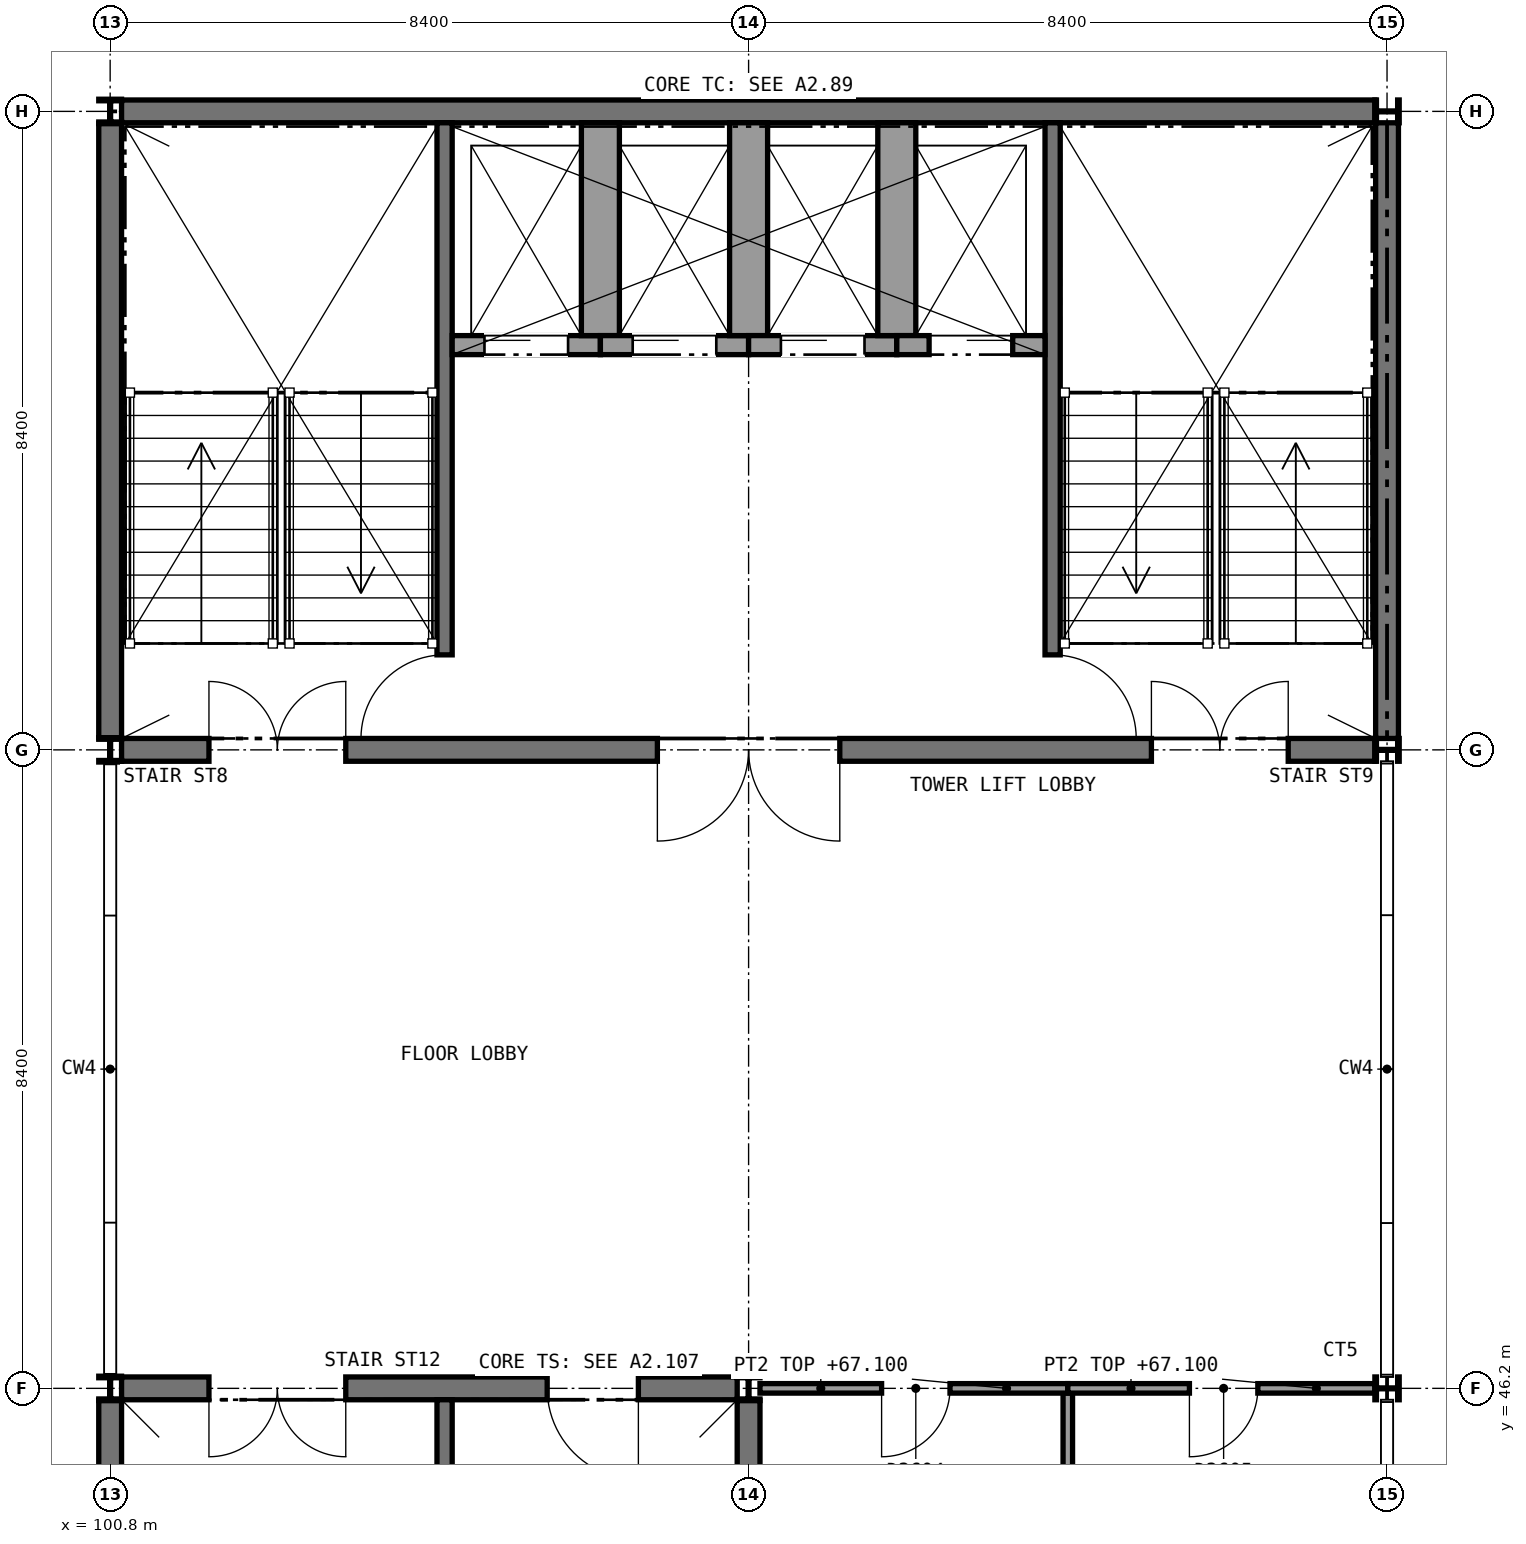
"""IFC4 building model, lengths in metres.
Left out: names, types, materials, properties, quantities, classifications, styles, units other than length and angle.
Written with IfcOpenShell. Run it as: python <this file> out.ifc"""

import sys

from ifc_helpers import new_model, si_unit, direction, frame, frame_2d, origin, origin_2d, place, context, subcontext, project, spatial, rectangle, i_section, extrude, element, fill, save


model = new_model("IFC4")
c1 = context("Model", 3, precision=1e-05, world=origin(), true_north=direction((0.0, 1.0)))
c2 = subcontext(c1, "Body", "Model", "MODEL_VIEW")
j1 = project(units=[si_unit("LENGTHUNIT", "METRE"), si_unit("PLANEANGLEUNIT", "RADIAN")], contexts=[c1])
p1 = place(None, origin())
s1 = spatial("IfcSite", under=j1, at=p1, CompositionType="ELEMENT")
p2 = place(p1, origin())
s2 = spatial("IfcBuilding", under=s1, at=p2, CompositionType="ELEMENT")
p3 = place(p2, frame((0.0, 0.0, 63.6)))
s3 = spatial("IfcBuildingStorey", under=s2, at=p3, CompositionType="ELEMENT", Elevation=63.6)
p4 = place(p3, frame((100.95, 63.0, 0.0), z_axis=(0.0, 0.0, 1.0), x_axis=(1.0, 0.0, 0.0)))
e1 = element("IfcWall", 1, at=p4, inside=s3, PredefinedType="SHEAR", context=c2, shape_type="SweptSolid", body=[
    extrude(rectangle(XDim=16.49, YDim=0.3, at=frame_2d((8.245, 0.0))), origin(), (0.0, 0.0, 1.0), 3.85),
])
p5 = place(p3, frame((100.95, 54.6, 0.0), z_axis=(0.0, 0.0, 1.0), x_axis=(1.0, 0.0, 0.0)))
e2 = element("IfcWall", 2, at=p5, inside=s3, PredefinedType="SHEAR", context=c2, shape_type="SweptSolid", body=[
    extrude(rectangle(XDim=16.49, YDim=0.3, at=frame_2d((8.245, 0.0))), origin(), (0.0, 0.0, 1.0), 3.85),
])
p6 = place(p5, frame((1.15, 0.0, 0.0)))
e3 = element("IfcOpeningElement", 3, at=p6, cuts=e2, PredefinedType="OPENING", context=c2, shape_type="SweptSolid", body=[
    extrude(rectangle(XDim=1.8, YDim=2.1, at=frame_2d((0.9, 1.05))), frame((0.0, 0.16, 0.0), z_axis=(0.0, -1.0, 0.0), x_axis=(1.0, 0.0, 0.0)), (0.0, 0.0, 1.0), 0.32),
])
p7 = place(p5, frame((13.55, 0.0, 0.0)))
e4 = element("IfcOpeningElement", 4, at=p7, cuts=e2, PredefinedType="OPENING", context=c2, shape_type="SweptSolid", body=[
    extrude(rectangle(XDim=1.8, YDim=2.1, at=frame_2d((0.9, 1.05))), frame((0.0, 0.16, 0.0), z_axis=(0.0, -1.0, 0.0), x_axis=(1.0, 0.0, 0.0)), (0.0, 0.0, 1.0), 0.32),
])
p8 = place(p5, frame((7.05, 0.0, 0.0)))
e5 = element("IfcOpeningElement", 5, at=p8, cuts=e2, PredefinedType="OPENING", context=c2, shape_type="SweptSolid", body=[
    extrude(rectangle(XDim=2.4, YDim=2.4, at=frame_2d((1.2, 1.2))), frame((0.0, 0.16, 0.0), z_axis=(0.0, -1.0, 0.0), x_axis=(1.0, 0.0, 0.0)), (0.0, 0.0, 1.0), 0.32),
])
p9 = place(p3, frame((100.8, 54.76, 0.0), z_axis=(0.0, 0.0, 1.0), x_axis=(0.0, 1.0, 0.0)))
e6 = element("IfcWall", 6, at=p9, inside=s3, PredefinedType="SHEAR", context=c2, shape_type="SweptSolid", body=[
    extrude(rectangle(XDim=8.08, YDim=0.3, at=frame_2d((4.04, 0.0))), origin(), (0.0, 0.0, 1.0), 3.85),
])
p10 = place(p3, frame((117.6, 54.75, 0.0), z_axis=(0.0, 0.0, 1.0), x_axis=(0.0, 1.0, 0.0)))
e7 = element("IfcWall", 7, at=p10, inside=s3, PredefinedType="SHEAR", context=c2, shape_type="SweptSolid", body=[
    extrude(rectangle(XDim=8.1, YDim=0.3, at=frame_2d((4.05, 0.0))), origin(), (0.0, 0.0, 1.0), 3.85),
])
p11 = place(p3, frame((100.95, 46.2, 0.0), z_axis=(0.0, 0.0, 1.0), x_axis=(1.0, 0.0, 0.0)))
e8 = element("IfcWall", 8, at=p11, inside=s3, PredefinedType="SHEAR", context=c2, shape_type="SweptSolid", body=[
    extrude(rectangle(XDim=8.1, YDim=0.3, at=frame_2d((4.05, 0.0))), origin(), (0.0, 0.0, 1.0), 3.85),
])
p12 = place(p11, frame((1.15, 0.0, 0.0)))
e9 = element("IfcOpeningElement", 9, at=p12, cuts=e8, PredefinedType="OPENING", context=c2, shape_type="SweptSolid", body=[
    extrude(rectangle(XDim=1.8, YDim=2.1, at=frame_2d((0.9, 1.05))), frame((0.0, 0.16, 0.0), z_axis=(0.0, -1.0, 0.0), x_axis=(1.0, 0.0, 0.0)), (0.0, 0.0, 1.0), 0.32),
])
p13 = place(p11, frame((5.6, 0.0, 0.0)))
e10 = element("IfcOpeningElement", 10, at=p13, cuts=e8, PredefinedType="OPENING", context=c2, shape_type="SweptSolid", body=[
    extrude(rectangle(XDim=1.2, YDim=2.1, at=frame_2d((0.6, 1.05))), frame((0.0, 0.16, 0.0), z_axis=(0.0, -1.0, 0.0), x_axis=(1.0, 0.0, 0.0)), (0.0, 0.0, 1.0), 0.32),
])
for number, where, z_axis, x_axis in (
    (11, (100.8, 37.96, 0.0), (0.0, 0.0, 1.0), (0.0, 1.0, 0.0)),
    (12, (109.2, 37.96, 0.0), (0.0, 0.0, 1.0), (0.0, 1.0, 0.0)),
):
    element("IfcWall", number, at=place(p3, frame(where, z_axis=z_axis, x_axis=x_axis)), inside=s3, PredefinedType="SHEAR", context=c2, shape_type="SweptSolid", body=[
        extrude(rectangle(XDim=8.08, YDim=0.3, at=frame_2d((4.04, 0.0))), origin(), (0.0, 0.0, 1.0), 3.85),
    ])
for number, where, z_axis, x_axis in (
    (13, (100.8, 46.2, 0.0), (0.0, 0.0, 1.0), (1.0, 0.0, 0.0)),
    (14, (100.8, 54.6, 0.0), (0.0, 0.0, 1.0), (1.0, 0.0, 0.0)),
    (15, (100.8, 63.0, 0.0), (0.0, 0.0, 1.0), (1.0, 0.0, 0.0)),
    (16, (109.2, 46.2, 0.0), (0.0, 0.0, 1.0), (1.0, 0.0, 0.0)),
    (17, (117.6, 46.2, 0.0), (0.0, 0.0, 1.0), (0.0, 1.0, 0.0)),
    (18, (117.6, 54.6, 0.0), (0.0, 0.0, 1.0), (0.0, 1.0, 0.0)),
    (19, (117.6, 63.0, 0.0), (0.0, 0.0, 1.0), (0.0, 1.0, 0.0)),
):
    element("IfcColumn", number, at=place(p3, frame(where, z_axis=z_axis, x_axis=x_axis)), inside=s3, PredefinedType="COLUMN", context=c2, shape_type="SweptSolid", body=[
        extrude(i_section(OverallWidth=0.3, OverallDepth=0.32, WebThickness=0.011, FlangeThickness=0.021, FilletRadius=0.027, at=origin_2d()), origin(), (0.0, 0.0, 1.0), 4.0),
    ])
p14 = place(p3, frame((113.4, 37.8, 0.0), z_axis=(0.0, 0.0, 1.0), x_axis=(0.0, 1.0, 0.0)))
e20 = element("IfcWall", 20, at=p14, inside=s3, PredefinedType="PARTITIONING", context=c2, shape_type="SweptSolid", body=[
    extrude(rectangle(XDim=8.4, YDim=0.125, at=frame_2d((4.2, 0.0))), origin(), (0.0, 0.0, 1.0), 3.85),
])
p15 = place(p3, frame((109.35, 46.2, 0.0), z_axis=(0.0, 0.0, 1.0), x_axis=(1.0, 0.0, 0.0)))
e21 = element("IfcWall", 21, at=p15, inside=s3, PredefinedType="PARTITIONING", context=c2, shape_type="SweptSolid", body=[
    extrude(rectangle(XDim=4.05, YDim=0.125, at=frame_2d((2.025, 0.0))), origin(), (0.0, 0.0, 1.0), 3.5),
])
p16 = place(p15, frame((1.6, 0.0, 0.0)))
e22 = element("IfcOpeningElement", 22, at=p16, cuts=e21, PredefinedType="OPENING", context=c2, shape_type="SweptSolid", body=[
    extrude(rectangle(XDim=0.9, YDim=2.1, at=frame_2d((0.45, 1.05))), frame((0.0, 0.073, 0.0), z_axis=(0.0, -1.0, 0.0), x_axis=(1.0, 0.0, 0.0)), (0.0, 0.0, 1.0), 0.145),
])
p17 = place(p3, frame((113.4, 46.2, 0.0), z_axis=(0.0, 0.0, 1.0), x_axis=(1.0, 0.0, 0.0)))
e23 = element("IfcWall", 23, at=p17, inside=s3, PredefinedType="PARTITIONING", context=c2, shape_type="SweptSolid", body=[
    extrude(rectangle(XDim=4.04, YDim=0.125, at=frame_2d((2.02, 0.0))), origin(), (0.0, 0.0, 1.0), 3.5),
])
p18 = place(p17, frame((1.6, 0.0, 0.0)))
e24 = element("IfcOpeningElement", 24, at=p18, cuts=e23, PredefinedType="OPENING", context=c2, shape_type="SweptSolid", body=[
    extrude(rectangle(XDim=0.9, YDim=2.1, at=frame_2d((0.45, 1.05))), frame((0.0, 0.073, 0.0), z_axis=(0.0, -1.0, 0.0), x_axis=(1.0, 0.0, 0.0)), (0.0, 0.0, 1.0), 0.145),
])
p19 = place(p3, frame((105.2, 62.85, 0.0), z_axis=(0.0, 0.0, 1.0), x_axis=(0.0, -1.0, 0.0)))
e25 = element("IfcWall", 25, at=p19, inside=s3, PredefinedType="SHEAR", context=c2, shape_type="SweptSolid", body=[
    extrude(rectangle(XDim=8.1, YDim=0.2, at=frame_2d((4.05, 0.0))), origin(), (0.0, 0.0, 1.0), 3.85),
])
p20 = place(p19, frame((7.0, 0.0, 0.0)))
e26 = element("IfcOpeningElement", 26, at=p20, cuts=e25, PredefinedType="OPENING", context=c2, shape_type="SweptSolid", body=[
    extrude(rectangle(XDim=1.11, YDim=2.1, at=frame_2d((0.555, 1.05))), frame((0.0, 0.11, 0.0), z_axis=(0.0, -1.0, 0.0), x_axis=(1.0, 0.0, 0.0)), (0.0, 0.0, 1.0), 0.22),
])
p21 = place(p3, frame((113.2, 62.85, 0.0), z_axis=(0.0, 0.0, 1.0), x_axis=(0.0, -1.0, 0.0)))
e27 = element("IfcWall", 27, at=p21, inside=s3, PredefinedType="SHEAR", context=c2, shape_type="SweptSolid", body=[
    extrude(rectangle(XDim=8.1, YDim=0.2, at=frame_2d((4.05, 0.0))), origin(), (0.0, 0.0, 1.0), 3.85),
])
p22 = place(p21, frame((7.0, 0.0, 0.0)))
e28 = element("IfcOpeningElement", 28, at=p22, cuts=e27, PredefinedType="OPENING", context=c2, shape_type="SweptSolid", body=[
    extrude(rectangle(XDim=1.11, YDim=2.1, at=frame_2d((0.555, 1.05))), frame((0.0, 0.11, 0.0), z_axis=(0.0, -1.0, 0.0), x_axis=(1.0, 0.0, 0.0)), (0.0, 0.0, 1.0), 0.22),
])
p23 = place(p3, frame((105.3, 59.925, 0.0), z_axis=(0.0, 0.0, 1.0), x_axis=(1.0, 0.0, 0.0)))
e29 = element("IfcWall", 29, at=p23, inside=s3, PredefinedType="SOLIDWALL", context=c2, shape_type="SweptSolid", body=[
    extrude(rectangle(XDim=1.95, YDim=0.25, at=frame_2d((0.975, 0.0))), origin(), (0.0, 0.0, 1.0), 4.0),
])
p24 = place(p23, frame((0.425, 0.0, 0.0)))
e30 = element("IfcOpeningElement", 30, at=p24, cuts=e29, PredefinedType="OPENING", context=c2, shape_type="SweptSolid", body=[
    extrude(rectangle(XDim=1.1, YDim=2.1, at=frame_2d((0.55, 1.05))), frame((0.0, 0.135, 0.0), z_axis=(0.0, -1.0, 0.0), x_axis=(1.0, 0.0, 0.0)), (0.0, 0.0, 1.0), 0.27),
])
p25 = place(p3, frame((107.25, 62.85, 0.0), z_axis=(0.0, 0.0, 1.0), x_axis=(0.0, -1.0, 0.0)))
e31 = element("IfcWall", 31, at=p25, inside=s3, PredefinedType="SOLIDWALL", context=c2, shape_type="SweptSolid", body=[
    extrude(rectangle(XDim=2.8, YDim=0.5, at=frame_2d((1.4, 0.0))), origin(), (0.0, 0.0, 1.0), 4.0),
])
p26 = place(p3, frame((107.25, 59.925, 0.0), z_axis=(0.0, 0.0, 1.0), x_axis=(1.0, 0.0, 0.0)))
e32 = element("IfcWall", 32, at=p26, inside=s3, PredefinedType="SOLIDWALL", context=c2, shape_type="SweptSolid", body=[
    extrude(rectangle(XDim=1.95, YDim=0.25, at=frame_2d((0.975, 0.0))), origin(), (0.0, 0.0, 1.0), 4.0),
])
p27 = place(p26, frame((0.425, 0.0, 0.0)))
e33 = element("IfcOpeningElement", 33, at=p27, cuts=e32, PredefinedType="OPENING", context=c2, shape_type="SweptSolid", body=[
    extrude(rectangle(XDim=1.1, YDim=2.1, at=frame_2d((0.55, 1.05))), frame((0.0, 0.135, 0.0), z_axis=(0.0, -1.0, 0.0), x_axis=(1.0, 0.0, 0.0)), (0.0, 0.0, 1.0), 0.27),
])
p28 = place(p3, frame((109.2, 62.85, 0.0), z_axis=(0.0, 0.0, 1.0), x_axis=(0.0, -1.0, 0.0)))
e34 = element("IfcWall", 34, at=p28, inside=s3, PredefinedType="SOLIDWALL", context=c2, shape_type="SweptSolid", body=[
    extrude(rectangle(XDim=2.8, YDim=0.5, at=frame_2d((1.4, 0.0))), origin(), (0.0, 0.0, 1.0), 4.0),
])
p29 = place(p3, frame((109.2, 59.925, 0.0), z_axis=(0.0, 0.0, 1.0), x_axis=(1.0, 0.0, 0.0)))
e35 = element("IfcWall", 35, at=p29, inside=s3, PredefinedType="SOLIDWALL", context=c2, shape_type="SweptSolid", body=[
    extrude(rectangle(XDim=1.95, YDim=0.25, at=frame_2d((0.975, 0.0))), origin(), (0.0, 0.0, 1.0), 4.0),
])
p30 = place(p29, frame((0.425, 0.0, 0.0)))
e36 = element("IfcOpeningElement", 36, at=p30, cuts=e35, PredefinedType="OPENING", context=c2, shape_type="SweptSolid", body=[
    extrude(rectangle(XDim=1.1, YDim=2.1, at=frame_2d((0.55, 1.05))), frame((0.0, 0.135, 0.0), z_axis=(0.0, -1.0, 0.0), x_axis=(1.0, 0.0, 0.0)), (0.0, 0.0, 1.0), 0.27),
])
p31 = place(p3, frame((111.15, 62.85, 0.0), z_axis=(0.0, 0.0, 1.0), x_axis=(0.0, -1.0, 0.0)))
e37 = element("IfcWall", 37, at=p31, inside=s3, PredefinedType="SOLIDWALL", context=c2, shape_type="SweptSolid", body=[
    extrude(rectangle(XDim=2.8, YDim=0.5, at=frame_2d((1.4, 0.0))), origin(), (0.0, 0.0, 1.0), 4.0),
])
p32 = place(p3, frame((111.15, 59.925, 0.0), z_axis=(0.0, 0.0, 1.0), x_axis=(1.0, 0.0, 0.0)))
e38 = element("IfcWall", 38, at=p32, inside=s3, PredefinedType="SOLIDWALL", context=c2, shape_type="SweptSolid", body=[
    extrude(rectangle(XDim=1.95, YDim=0.25, at=frame_2d((0.975, 0.0))), origin(), (0.0, 0.0, 1.0), 4.0),
])
p33 = place(p32, frame((0.425, 0.0, 0.0)))
e39 = element("IfcOpeningElement", 39, at=p33, cuts=e38, PredefinedType="OPENING", context=c2, shape_type="SweptSolid", body=[
    extrude(rectangle(XDim=1.1, YDim=2.1, at=frame_2d((0.55, 1.05))), frame((0.0, 0.135, 0.0), z_axis=(0.0, -1.0, 0.0), x_axis=(1.0, 0.0, 0.0)), (0.0, 0.0, 1.0), 0.27),
])
p34 = place(p3, frame((105.2, 37.95, 0.0), z_axis=(0.0, 0.0, 1.0), x_axis=(0.0, 1.0, 0.0)))
e40 = element("IfcWall", 40, at=p34, inside=s3, PredefinedType="SHEAR", context=c2, shape_type="SweptSolid", body=[
    extrude(rectangle(XDim=8.1, YDim=0.2, at=frame_2d((4.05, 0.0))), origin(), (0.0, 0.0, 1.0), 3.85),
])
p35 = place(p16, frame((0.9, 0.0, 0.0), z_axis=(0.0, 0.0, 1.0), x_axis=(-1.0, 0.0, 0.0)))
e41 = element("IfcDoor", 41, at=p35, inside=s3, OperationType="SINGLE_SWING_RIGHT", PredefinedType="DOOR", context=c2, shape_type="SweptSolid", body=[
    extrude(rectangle(XDim=0.9, YDim=2.1, at=frame_2d((0.45, 1.05))), frame((0.0, 0.025, 0.0), z_axis=(0.0, -1.0, 0.0), x_axis=(1.0, 0.0, 0.0)), (0.0, 0.0, 1.0), 0.05),
])
fill(e22, e41)
p36 = place(p18, frame((0.9, 0.0, 0.0), z_axis=(0.0, 0.0, 1.0), x_axis=(-1.0, 0.0, 0.0)))
e42 = element("IfcDoor", 42, at=p36, inside=s3, OperationType="SINGLE_SWING_RIGHT", PredefinedType="DOOR", context=c2, shape_type="SweptSolid", body=[
    extrude(rectangle(XDim=0.9, YDim=2.1, at=frame_2d((0.45, 1.05))), frame((0.0, 0.025, 0.0), z_axis=(0.0, -1.0, 0.0), x_axis=(1.0, 0.0, 0.0)), (0.0, 0.0, 1.0), 0.05),
])
fill(e24, e42)
p37 = place(p20, frame((1.1, 0.0, 0.0), z_axis=(0.0, 0.0, 1.0), x_axis=(-1.0, 0.0, 0.0)))
e43 = element("IfcDoor", 43, at=p37, inside=s3, OperationType="SINGLE_SWING_LEFT", PredefinedType="DOOR", context=c2, shape_type="SweptSolid", body=[
    extrude(rectangle(XDim=1.1, YDim=2.1, at=frame_2d((0.55, 1.05))), frame((0.0, 0.025, 0.0), z_axis=(0.0, -1.0, 0.0), x_axis=(1.0, 0.0, 0.0)), (0.0, 0.0, 1.0), 0.05),
])
fill(e26, e43)
p38 = place(p22, origin())
e44 = element("IfcDoor", 44, at=p38, inside=s3, OperationType="SINGLE_SWING_RIGHT", PredefinedType="DOOR", context=c2, shape_type="SweptSolid", body=[
    extrude(rectangle(XDim=1.1, YDim=2.1, at=frame_2d((0.55, 1.05))), frame((0.0, 0.025, 0.0), z_axis=(0.0, -1.0, 0.0), x_axis=(1.0, 0.0, 0.0)), (0.0, 0.0, 1.0), 0.05),
])
fill(e28, e44)
p39 = place(p24, frame((1.1, 0.0, 0.0), z_axis=(0.0, 0.0, 1.0), x_axis=(-1.0, 0.0, 0.0)))
e45 = element("IfcDoor", 45, at=p39, inside=s3, OperationType="SLIDING_TO_RIGHT", PredefinedType="DOOR", context=c2, shape_type="SweptSolid", body=[
    extrude(rectangle(XDim=1.1, YDim=2.1, at=frame_2d((0.55, 1.05))), frame((0.0, 0.025, 0.0), z_axis=(0.0, -1.0, 0.0), x_axis=(1.0, 0.0, 0.0)), (0.0, 0.0, 1.0), 0.05),
])
fill(e30, e45)
p40 = place(p27, frame((1.1, 0.0, 0.0), z_axis=(0.0, 0.0, 1.0), x_axis=(-1.0, 0.0, 0.0)))
e46 = element("IfcDoor", 46, at=p40, inside=s3, OperationType="SLIDING_TO_RIGHT", PredefinedType="DOOR", context=c2, shape_type="SweptSolid", body=[
    extrude(rectangle(XDim=1.1, YDim=2.1, at=frame_2d((0.55, 1.05))), frame((0.0, 0.025, 0.0), z_axis=(0.0, -1.0, 0.0), x_axis=(1.0, 0.0, 0.0)), (0.0, 0.0, 1.0), 0.05),
])
fill(e33, e46)
p41 = place(p30, frame((1.1, 0.0, 0.0), z_axis=(0.0, 0.0, 1.0), x_axis=(-1.0, 0.0, 0.0)))
e47 = element("IfcDoor", 47, at=p41, inside=s3, OperationType="SLIDING_TO_RIGHT", PredefinedType="DOOR", context=c2, shape_type="SweptSolid", body=[
    extrude(rectangle(XDim=1.1, YDim=2.1, at=frame_2d((0.55, 1.05))), frame((0.0, 0.025, 0.0), z_axis=(0.0, -1.0, 0.0), x_axis=(1.0, 0.0, 0.0)), (0.0, 0.0, 1.0), 0.05),
])
fill(e36, e47)
p42 = place(p33, frame((1.1, 0.0, 0.0), z_axis=(0.0, 0.0, 1.0), x_axis=(-1.0, 0.0, 0.0)))
e48 = element("IfcDoor", 48, at=p42, inside=s3, OperationType="SLIDING_TO_LEFT", PredefinedType="DOOR", context=c2, shape_type="SweptSolid", body=[
    extrude(rectangle(XDim=1.1, YDim=2.1, at=frame_2d((0.55, 1.05))), frame((0.0, 0.025, 0.0), z_axis=(0.0, -1.0, 0.0), x_axis=(1.0, 0.0, 0.0)), (0.0, 0.0, 1.0), 0.05),
])
fill(e39, e48)
p43 = place(p6, origin())
e49 = element("IfcDoor", 49, at=p43, inside=s3, OperationType="DOUBLE_DOOR_SINGLE_SWING", PredefinedType="DOOR", context=c2, shape_type="SweptSolid", body=[
    extrude(rectangle(XDim=1.8, YDim=2.1, at=frame_2d((0.9, 1.05))), frame((0.0, 0.025, 0.0), z_axis=(0.0, -1.0, 0.0), x_axis=(1.0, 0.0, 0.0)), (0.0, 0.0, 1.0), 0.05),
])
fill(e3, e49)
p44 = place(p7, origin())
e50 = element("IfcDoor", 50, at=p44, inside=s3, OperationType="DOUBLE_DOOR_SINGLE_SWING", PredefinedType="DOOR", context=c2, shape_type="SweptSolid", body=[
    extrude(rectangle(XDim=1.8, YDim=2.1, at=frame_2d((0.9, 1.05))), frame((0.0, 0.025, 0.0), z_axis=(0.0, -1.0, 0.0), x_axis=(1.0, 0.0, 0.0)), (0.0, 0.0, 1.0), 0.05),
])
fill(e4, e50)
p45 = place(p8, frame((2.4, 0.0, 0.0), z_axis=(0.0, 0.0, 1.0), x_axis=(-1.0, 0.0, 0.0)))
e51 = element("IfcDoor", 51, at=p45, inside=s3, OperationType="DOUBLE_DOOR_SINGLE_SWING", PredefinedType="DOOR", context=c2, shape_type="SweptSolid", body=[
    extrude(rectangle(XDim=2.4, YDim=2.4, at=frame_2d((1.2, 1.2))), frame((0.0, 0.025, 0.0), z_axis=(0.0, -1.0, 0.0), x_axis=(1.0, 0.0, 0.0)), (0.0, 0.0, 1.0), 0.05),
])
fill(e5, e51)
p46 = place(p12, frame((1.8, 0.0, 0.0), z_axis=(0.0, 0.0, 1.0), x_axis=(-1.0, 0.0, 0.0)))
e52 = element("IfcDoor", 52, at=p46, inside=s3, OperationType="DOUBLE_DOOR_SINGLE_SWING", PredefinedType="DOOR", context=c2, shape_type="SweptSolid", body=[
    extrude(rectangle(XDim=1.8, YDim=2.1, at=frame_2d((0.9, 1.05))), frame((0.0, 0.025, 0.0), z_axis=(0.0, -1.0, 0.0), x_axis=(1.0, 0.0, 0.0)), (0.0, 0.0, 1.0), 0.05),
])
fill(e9, e52)
p47 = place(p13, frame((1.2, 0.0, 0.0), z_axis=(0.0, 0.0, 1.0), x_axis=(-1.0, 0.0, 0.0)))
e53 = element("IfcDoor", 53, at=p47, inside=s3, OperationType="SINGLE_SWING_LEFT", PredefinedType="DOOR", context=c2, shape_type="SweptSolid", body=[
    extrude(rectangle(XDim=1.2, YDim=2.1, at=frame_2d((0.6, 1.05))), frame((0.0, 0.025, 0.0), z_axis=(0.0, -1.0, 0.0), x_axis=(1.0, 0.0, 0.0)), (0.0, 0.0, 1.0), 0.05),
])
fill(e10, e53)
save(model, sys.argv[1])
